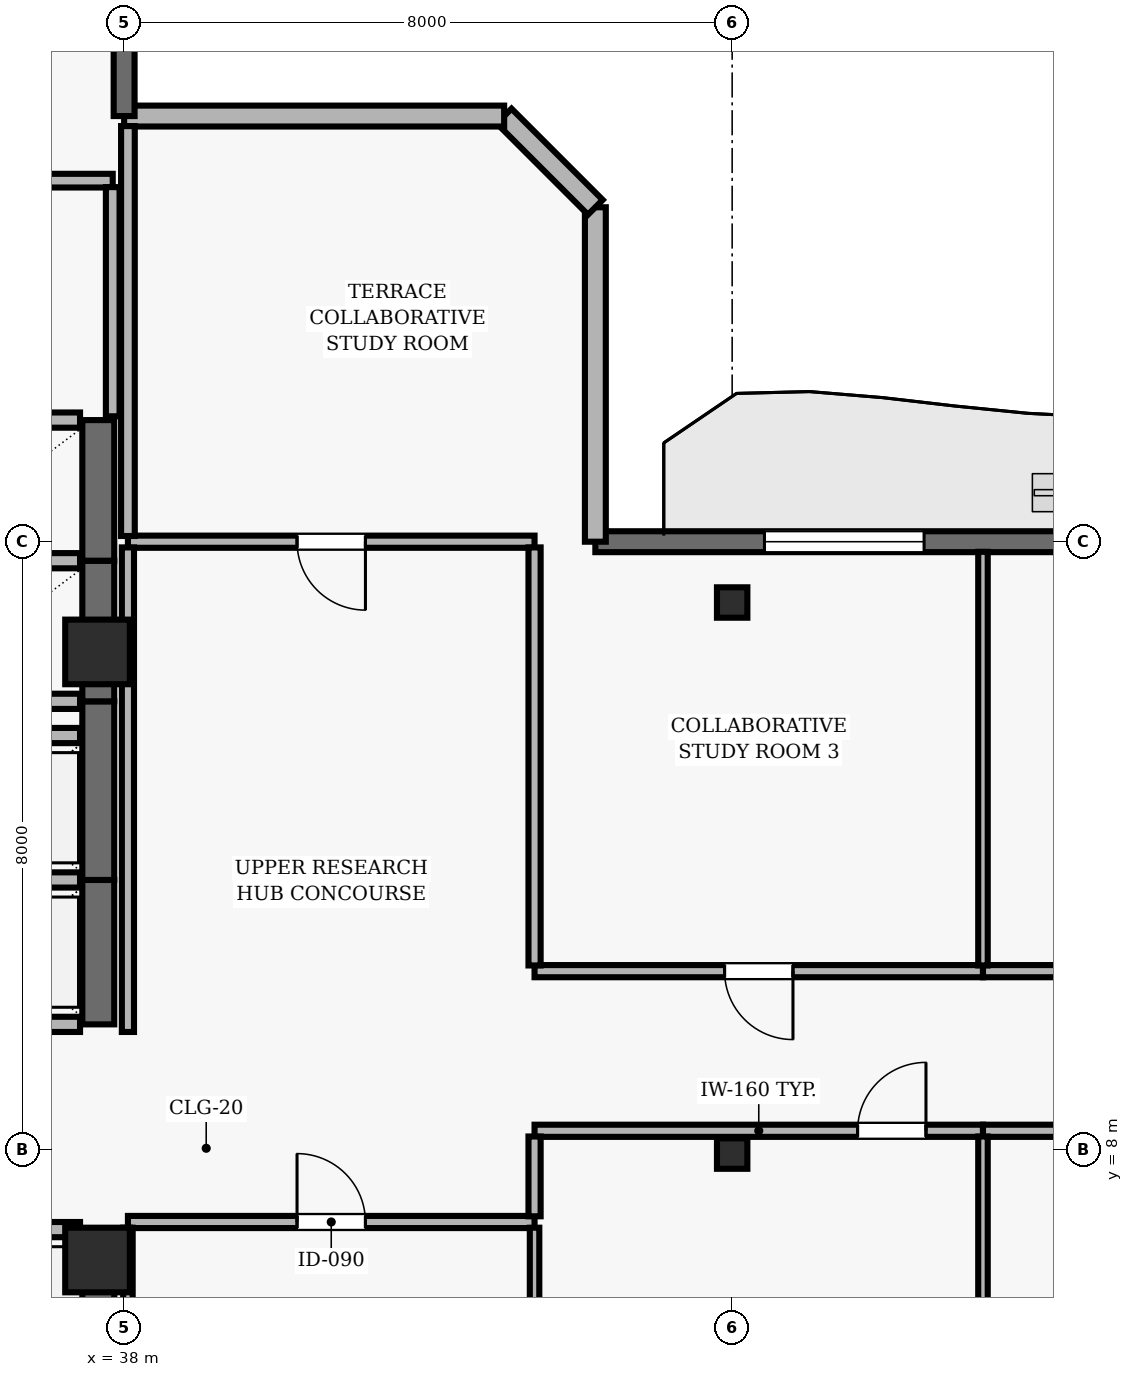
"""IFC4 building model, lengths in metres.
Left out: names, types, materials, properties, quantities, classifications, styles, units other than length and angle.
Written with IfcOpenShell. Run it as: python <this file> out.ifc"""

import sys

from ifc_helpers import new_model, si_unit, direction, frame, frame_2d, origin, origin_2d, place, context, subcontext, project, spatial, rectangle, hollow_rectangle, extrude, element, fill, save


model = new_model("IFC4")
c1 = context("Model", 3, precision=1e-05, world=origin(), true_north=direction((0.0, 1.0)))
c2 = subcontext(c1, "Body", "Model", "MODEL_VIEW")
j1 = project(units=[si_unit("LENGTHUNIT", "METRE"), si_unit("PLANEANGLEUNIT", "RADIAN")], contexts=[c1])
p1 = place(None, origin())
s1 = spatial("IfcSite", under=j1, at=p1, CompositionType="ELEMENT")
p2 = place(p1, origin())
s2 = spatial("IfcBuilding", under=s1, at=p2, CompositionType="ELEMENT")
p3 = place(p2, frame((0.0, 0.0, 291.1)))
s3 = spatial("IfcBuildingStorey", under=s2, at=p3, CompositionType="ELEMENT", Elevation=291.1)
for number, where, z_axis, x_axis in (
    (1, (37.65, 6.55, 0.0), (0.0, 0.0, 1.0), (1.0, 0.0, 0.0)),
    (2, (37.65, 14.55, 0.0), (0.0, 0.0, 1.0), (1.0, 0.0, 0.0)),
):
    element("IfcColumn", number, at=place(p3, frame(where, z_axis=z_axis, x_axis=x_axis)), inside=s3, PredefinedType="COLUMN", context=c2, shape_type="SweptSolid", body=[
        extrude(rectangle(XDim=0.85, YDim=0.85, at=origin_2d()), origin(), (0.0, 0.0, 1.0), 3.9),
    ])
for number, where, z_axis, x_axis in (
    (3, (46.0, 7.95, 0.0), (0.0, 0.0, 1.0), (1.0, 0.0, 0.0)),
    (4, (46.0, 15.2, 0.0), (0.0, 0.0, 1.0), (1.0, 0.0, 0.0)),
):
    element("IfcColumn", number, at=place(p3, frame(where, z_axis=z_axis, x_axis=x_axis)), inside=s3, PredefinedType="COLUMN", context=c2, shape_type="SweptSolid", body=[
        extrude(hollow_rectangle(XDim=0.4, YDim=0.4, WallThickness=0.02, at=origin_2d()), origin(), (0.0, 0.0, 1.0), 3.9),
    ])
p4 = place(p3, frame((57.3, 16.0, 0.0), z_axis=(0.0, 0.0, 1.0), x_axis=(-1.0, 0.0, 0.0)))
e5 = element("IfcWall", 5, at=p4, inside=s3, PredefinedType="SOLIDWALL", context=c2, shape_type="SweptSolid", body=[
    extrude(rectangle(XDim=13.1, YDim=0.275, at=frame_2d((6.55, 0.0))), origin(), (0.0, 0.0, 1.0), 3.69),
])
p5 = place(p4, frame((1.15, 0.0, 0.0)))
e6 = element("IfcOpeningElement", 6, at=p5, cuts=e5, PredefinedType="OPENING", context=c2, shape_type="SweptSolid", body=[
    extrude(rectangle(XDim=1.0, YDim=2.2, at=frame_2d((0.5, 1.1))), frame((0.0, 0.147, 0.0), z_axis=(0.0, -1.0, 0.0), x_axis=(1.0, 0.0, 0.0)), (0.0, 0.0, 1.0), 0.295),
])
p6 = place(p4, frame((3.125, 0.0, 0.9)))
e7 = element("IfcOpeningElement", 7, at=p6, cuts=e5, PredefinedType="OPENING", context=c2, shape_type="SweptSolid", body=[
    extrude(rectangle(XDim=2.1, YDim=1.6, at=frame_2d((1.05, 0.8))), frame((0.0, 0.147, 0.0), z_axis=(0.0, -1.0, 0.0), x_axis=(1.0, 0.0, 0.0)), (0.0, 0.0, 1.0), 0.295),
])
p7 = place(p4, frame((8.775, 0.0, 0.9)))
e8 = element("IfcOpeningElement", 8, at=p7, cuts=e5, PredefinedType="OPENING", context=c2, shape_type="SweptSolid", body=[
    extrude(rectangle(XDim=2.1, YDim=1.6, at=frame_2d((1.05, 0.8))), frame((0.0, 0.147, 0.0), z_axis=(0.0, -1.0, 0.0), x_axis=(1.0, 0.0, 0.0)), (0.0, 0.0, 1.0), 0.295),
])
p8 = place(p3, frame((44.2, 16.0, 0.0), z_axis=(0.0, 0.0, 1.0), x_axis=(0.0, 1.0, 0.0)))
e9 = element("IfcWall", 9, at=p8, inside=s3, PredefinedType="SOLIDWALL", context=c2, shape_type="SweptSolid", body=[
    extrude(rectangle(XDim=4.4, YDim=0.275, at=frame_2d((2.2, 0.0))), origin(), (0.0, 0.0, 1.0), 3.69),
])
p9 = place(p3, frame((44.2, 20.4, 0.0), z_axis=(0.0, 0.0, 1.0), x_axis=(-0.707034851297, 0.707178703759, 0.0)))
e10 = element("IfcWall", 10, at=p9, inside=s3, PredefinedType="SOLIDWALL", context=c2, shape_type="SweptSolid", body=[
    extrude(rectangle(XDim=1.697, YDim=0.275, at=frame_2d((0.849, 0.0))), origin(), (0.0, 0.0, 1.0), 3.69),
])
p10 = place(p3, frame((43.0, 21.6, 0.0), z_axis=(0.0, 0.0, 1.0), x_axis=(-1.0, 0.0, 0.0)))
e11 = element("IfcWall", 11, at=p10, inside=s3, PredefinedType="SOLIDWALL", context=c2, shape_type="SweptSolid", body=[
    extrude(rectangle(XDim=5.0, YDim=0.275, at=frame_2d((2.5, 0.0))), origin(), (0.0, 0.0, 1.0), 3.69),
])
p11 = place(p3, frame((38.0, 21.6, 0.0), z_axis=(0.0, 0.0, 1.0), x_axis=(0.0, 1.0, 0.0)))
e12 = element("IfcWall", 12, at=p11, inside=s3, PredefinedType="SOLIDWALL", context=c2, shape_type="SweptSolid", body=[
    extrude(rectangle(XDim=13.7, YDim=0.275, at=frame_2d((6.85, 0.0))), origin(), (0.0, 0.0, 1.0), 3.69),
])
p12 = place(p11, frame((5.35, 0.0, 0.0)))
e13 = element("IfcOpeningElement", 13, at=p12, cuts=e12, PredefinedType="OPENING", context=c2, shape_type="SweptSolid", body=[
    extrude(rectangle(XDim=1.0, YDim=2.2, at=frame_2d((0.5, 1.1))), frame((0.0, 0.147, 0.0), z_axis=(0.0, -1.0, 0.0), x_axis=(1.0, 0.0, 0.0)), (0.0, 0.0, 1.0), 0.295),
])
p13 = place(p11, frame((9.075, 0.0, 0.9)))
e14 = element("IfcOpeningElement", 14, at=p13, cuts=e12, PredefinedType="OPENING", context=c2, shape_type="SweptSolid", body=[
    extrude(rectangle(XDim=2.4, YDim=1.8, at=frame_2d((1.2, 0.9))), frame((0.0, 0.147, 0.0), z_axis=(0.0, -1.0, 0.0), x_axis=(1.0, 0.0, 0.0)), (0.0, 0.0, 1.0), 0.295),
])
p14 = place(p3, frame((37.66, 4.7, 0.0), z_axis=(0.0, 0.0, 1.0), x_axis=(0.0, 1.0, 0.0)))
e15 = element("IfcWall", 15, at=p14, inside=s3, PredefinedType="SHEAR", context=c2, shape_type="SweptSolid", body=[
    extrude(rectangle(XDim=2.25, YDim=0.42, at=frame_2d((1.125, 0.0))), origin(), (0.0, 0.0, 1.0), 3.69),
])
p15 = place(p3, frame((37.42, 6.95, 0.0), z_axis=(0.0, 0.0, 1.0), x_axis=(-1.0, 0.0, 0.0)))
e16 = element("IfcWall", 16, at=p15, inside=s3, PredefinedType="SOLIDWALL", context=c2, shape_type="SweptSolid", body=[
    extrude(rectangle(XDim=2.14, YDim=0.2, at=frame_2d((1.07, 0.0))), origin(), (0.0, 0.0, 1.0), 3.69),
])
p16 = place(p3, frame((37.66, 9.65, 0.0), z_axis=(0.0, 0.0, 1.0), x_axis=(0.0, 1.0, 0.0)))
e17 = element("IfcWall", 17, at=p16, inside=s3, PredefinedType="SHEAR", context=c2, shape_type="SweptSolid", body=[
    extrude(rectangle(XDim=1.9, YDim=0.42, at=frame_2d((0.95, 0.0))), origin(), (0.0, 0.0, 1.0), 3.69),
])
for number, where, z_axis, x_axis in (
    (18, (35.28, 9.65, 0.0), (0.0, 0.0, 1.0), (1.0, 0.0, 0.0)),
    (19, (37.42, 11.55, 0.0), (0.0, 0.0, 1.0), (-1.0, 0.0, 0.0)),
):
    element("IfcWall", number, at=place(p3, frame(where, z_axis=z_axis, x_axis=x_axis)), inside=s3, PredefinedType="SOLIDWALL", context=c2, shape_type="SweptSolid", body=[
        extrude(rectangle(XDim=2.14, YDim=0.2, at=frame_2d((1.07, 0.0))), origin(), (0.0, 0.0, 1.0), 3.69),
    ])
p17 = place(p3, frame((37.66, 11.55, 0.0), z_axis=(0.0, 0.0, 1.0), x_axis=(0.0, 1.0, 0.0)))
e20 = element("IfcWall", 20, at=p17, inside=s3, PredefinedType="SHEAR", context=c2, shape_type="SweptSolid", body=[
    extrude(rectangle(XDim=2.35, YDim=0.42, at=frame_2d((1.175, 0.0))), origin(), (0.0, 0.0, 1.0), 3.69),
])
p18 = place(p3, frame((37.42, 13.45, 0.0), z_axis=(0.0, 0.0, 1.0), x_axis=(-1.0, 0.0, 0.0)))
e21 = element("IfcWall", 21, at=p18, inside=s3, PredefinedType="SOLIDWALL", context=c2, shape_type="SweptSolid", body=[
    extrude(rectangle(XDim=2.14, YDim=0.2, at=frame_2d((1.07, 0.0))), origin(), (0.0, 0.0, 1.0), 3.69),
])
p19 = place(p3, frame((37.66, 13.9, 0.0), z_axis=(0.0, 0.0, 1.0), x_axis=(0.0, 1.0, 0.0)))
e22 = element("IfcWall", 22, at=p19, inside=s3, PredefinedType="SHEAR", context=c2, shape_type="SweptSolid", body=[
    extrude(rectangle(XDim=1.85, YDim=0.42, at=frame_2d((0.925, 0.0))), origin(), (0.0, 0.0, 1.0), 3.69),
])
for number, where, z_axis, x_axis in (
    (23, (35.28, 13.9, 0.0), (0.0, 0.0, 1.0), (1.0, 0.0, 0.0)),
    (24, (37.42, 15.75, 0.0), (0.0, 0.0, 1.0), (-1.0, 0.0, 0.0)),
):
    element("IfcWall", number, at=place(p3, frame(where, z_axis=z_axis, x_axis=x_axis)), inside=s3, PredefinedType="SOLIDWALL", context=c2, shape_type="SweptSolid", body=[
        extrude(rectangle(XDim=2.14, YDim=0.2, at=frame_2d((1.07, 0.0))), origin(), (0.0, 0.0, 1.0), 3.69),
    ])
p20 = place(p3, frame((37.66, 15.75, 0.0), z_axis=(0.0, 0.0, 1.0), x_axis=(0.0, 1.0, 0.0)))
e25 = element("IfcWall", 25, at=p20, inside=s3, PredefinedType="SHEAR", context=c2, shape_type="SweptSolid", body=[
    extrude(rectangle(XDim=1.85, YDim=0.42, at=frame_2d((0.925, 0.0))), origin(), (0.0, 0.0, 1.0), 3.69),
])
p21 = place(p3, frame((37.42, 17.6, 0.0), z_axis=(0.0, 0.0, 1.0), x_axis=(-1.0, 0.0, 0.0)))
e26 = element("IfcWall", 26, at=p21, inside=s3, PredefinedType="SOLIDWALL", context=c2, shape_type="SweptSolid", body=[
    extrude(rectangle(XDim=2.14, YDim=0.2, at=frame_2d((1.07, 0.0))), origin(), (0.0, 0.0, 1.0), 3.69),
])
p22 = place(p3, frame((37.85, 20.75, 0.0), z_axis=(0.0, 0.0, 1.0), x_axis=(-1.0, 0.0, 0.0)))
e27 = element("IfcWall", 27, at=p22, inside=s3, PredefinedType="PARTITIONING", context=c2, shape_type="SweptSolid", body=[
    extrude(rectangle(XDim=4.0, YDim=0.18, at=frame_2d((2.0, 0.0))), origin(), (0.0, 0.0, 1.0), 3.69),
])
p23 = place(p3, frame((38.05, 7.05, 0.0), z_axis=(0.0, 0.0, 1.0), x_axis=(1.0, 0.0, 0.0)))
e28 = element("IfcWall", 28, at=p23, inside=s3, PredefinedType="PARTITIONING", context=c2, shape_type="SweptSolid", body=[
    extrude(rectangle(XDim=5.35, YDim=0.16, at=frame_2d((2.675, 0.0))), origin(), (0.0, 0.0, 1.0), 3.69),
])
p24 = place(p23, frame((2.225, 0.0, 0.0)))
e29 = element("IfcOpeningElement", 29, at=p24, cuts=e28, PredefinedType="OPENING", context=c2, shape_type="SweptSolid", body=[
    extrude(rectangle(XDim=0.9, YDim=2.1, at=frame_2d((0.45, 1.05))), frame((0.0, 0.09, 0.0), z_axis=(0.0, -1.0, 0.0), x_axis=(1.0, 0.0, 0.0)), (0.0, 0.0, 1.0), 0.18),
])
p25 = place(p3, frame((43.4, 8.25, 0.0), z_axis=(0.0, 0.0, 1.0), x_axis=(1.0, 0.0, 0.0)))
e30 = element("IfcWall", 30, at=p25, inside=s3, PredefinedType="PARTITIONING", context=c2, shape_type="SweptSolid", body=[
    extrude(rectangle(XDim=5.9, YDim=0.16, at=frame_2d((2.95, 0.0))), origin(), (0.0, 0.0, 1.0), 3.227),
])
p26 = place(p25, frame((4.25, 0.0, 0.0)))
e31 = element("IfcOpeningElement", 31, at=p26, cuts=e30, PredefinedType="OPENING", context=c2, shape_type="SweptSolid", body=[
    extrude(rectangle(XDim=0.9, YDim=2.1, at=frame_2d((0.45, 1.05))), frame((0.0, 0.09, 0.0), z_axis=(0.0, -1.0, 0.0), x_axis=(1.0, 0.0, 0.0)), (0.0, 0.0, 1.0), 0.18),
])
p27 = place(p3, frame((43.4, 16.0, 0.0), z_axis=(0.0, 0.0, 1.0), x_axis=(-1.0, 0.0, 0.0)))
e32 = element("IfcWall", 32, at=p27, inside=s3, PredefinedType="PARTITIONING", context=c2, shape_type="SweptSolid", body=[
    extrude(rectangle(XDim=5.35, YDim=0.16, at=frame_2d((2.675, 0.0))), origin(), (0.0, 0.0, 1.0), 3.39),
])
p28 = place(p27, frame((2.225, 0.0, 0.0)))
e33 = element("IfcOpeningElement", 33, at=p28, cuts=e32, PredefinedType="OPENING", context=c2, shape_type="SweptSolid", body=[
    extrude(rectangle(XDim=0.9, YDim=2.1, at=frame_2d((0.45, 1.05))), frame((0.0, 0.09, 0.0), z_axis=(0.0, -1.0, 0.0), x_axis=(1.0, 0.0, 0.0)), (0.0, 0.0, 1.0), 0.18),
])
p29 = place(p3, frame((49.3, 8.25, 0.0), z_axis=(0.0, 0.0, 1.0), x_axis=(1.0, 0.0, 0.0)))
e34 = element("IfcWall", 34, at=p29, inside=s3, PredefinedType="PARTITIONING", context=c2, shape_type="SweptSolid", body=[
    extrude(rectangle(XDim=5.58, YDim=0.16, at=frame_2d((2.79, 0.0))), origin(), (0.0, 0.0, 1.0), 3.227),
])
p30 = place(p29, frame((3.74, 0.0, 0.0)))
e35 = element("IfcOpeningElement", 35, at=p30, cuts=e34, PredefinedType="OPENING", context=c2, shape_type="SweptSolid", body=[
    extrude(rectangle(XDim=0.9, YDim=2.1, at=frame_2d((0.45, 1.05))), frame((0.0, 0.09, 0.0), z_axis=(0.0, -1.0, 0.0), x_axis=(1.0, 0.0, 0.0)), (0.0, 0.0, 1.0), 0.18),
])
p31 = place(p3, frame((49.3, 10.35, 0.0), z_axis=(0.0, 0.0, 1.0), x_axis=(-1.0, 0.0, 0.0)))
e36 = element("IfcWall", 36, at=p31, inside=s3, PredefinedType="PARTITIONING", context=c2, shape_type="SweptSolid", body=[
    extrude(rectangle(XDim=5.9, YDim=0.16, at=frame_2d((2.95, 0.0))), origin(), (0.0, 0.0, 1.0), 3.424),
])
p32 = place(p31, frame((2.5, 0.0, 0.0)))
e37 = element("IfcOpeningElement", 37, at=p32, cuts=e36, PredefinedType="OPENING", context=c2, shape_type="SweptSolid", body=[
    extrude(rectangle(XDim=0.9, YDim=2.1, at=frame_2d((0.45, 1.05))), frame((0.0, 0.09, 0.0), z_axis=(0.0, -1.0, 0.0), x_axis=(1.0, 0.0, 0.0)), (0.0, 0.0, 1.0), 0.18),
])
p33 = place(p3, frame((54.88, 10.35, 0.0), z_axis=(0.0, 0.0, 1.0), x_axis=(-1.0, 0.0, 0.0)))
e38 = element("IfcWall", 38, at=p33, inside=s3, PredefinedType="PARTITIONING", context=c2, shape_type="SweptSolid", body=[
    extrude(rectangle(XDim=5.58, YDim=0.16, at=frame_2d((2.79, 0.0))), origin(), (0.0, 0.0, 1.0), 3.424),
])
p34 = place(p33, frame((2.34, 0.0, 0.0)))
e39 = element("IfcOpeningElement", 39, at=p34, cuts=e38, PredefinedType="OPENING", context=c2, shape_type="SweptSolid", body=[
    extrude(rectangle(XDim=0.9, YDim=2.1, at=frame_2d((0.45, 1.05))), frame((0.0, 0.09, 0.0), z_axis=(0.0, -1.0, 0.0), x_axis=(1.0, 0.0, 0.0)), (0.0, 0.0, 1.0), 0.18),
])
p35 = place(p3, frame((37.85, 17.65, 0.0), z_axis=(0.0, 0.0, 1.0), x_axis=(0.0, 1.0, 0.0)))
e40 = element("IfcWall", 40, at=p35, inside=s3, PredefinedType="PARTITIONING", context=c2, shape_type="SweptSolid", body=[
    extrude(rectangle(XDim=3.015, YDim=0.18, at=frame_2d((1.508, 0.0))), origin(), (0.0, 0.0, 1.0), 3.227),
])
p36 = place(p3, frame((38.05, 6.975, 0.0), z_axis=(0.0, 0.0, 1.0), x_axis=(0.0, -1.0, 0.0)))
e41 = element("IfcWall", 41, at=p36, inside=s3, PredefinedType="PARTITIONING", context=c2, shape_type="SweptSolid", body=[
    extrude(rectangle(XDim=6.842, YDim=0.125, at=frame_2d((3.421, 0.0))), origin(), (0.0, 0.0, 1.0), 3.227),
])
p37 = place(p3, frame((38.05, 15.925, 0.0), z_axis=(0.0, 0.0, 1.0), x_axis=(0.0, -1.0, 0.0)))
e42 = element("IfcWall", 42, at=p37, inside=s3, PredefinedType="PARTITIONING", context=c2, shape_type="SweptSolid", body=[
    extrude(rectangle(XDim=6.375, YDim=0.16, at=frame_2d((3.188, 0.0))), origin(), (0.0, 0.0, 1.0), 3.227),
])
p38 = place(p3, frame((38.05, 21.468, 0.0), z_axis=(0.0, 0.0, 1.0), x_axis=(0.0, -1.0, 0.0)))
e43 = element("IfcWall", 43, at=p38, inside=s3, PredefinedType="PARTITIONING", context=c2, shape_type="SweptSolid", body=[
    extrude(rectangle(XDim=5.393, YDim=0.18, at=frame_2d((2.697, 0.0))), origin(), (0.0, 0.0, 1.0), 3.227),
])
p39 = place(p3, frame((43.4, 0.133, 0.0), z_axis=(0.0, 0.0, 1.0), x_axis=(0.0, 1.0, 0.0)))
e44 = element("IfcWall", 44, at=p39, inside=s3, PredefinedType="PARTITIONING", context=c2, shape_type="SweptSolid", body=[
    extrude(rectangle(XDim=6.842, YDim=0.125, at=frame_2d((3.421, 0.0))), origin(), (0.0, 0.0, 1.0), 3.69),
])
p40 = place(p3, frame((43.4, 7.125, 0.0), z_axis=(0.0, 0.0, 1.0), x_axis=(0.0, 1.0, 0.0)))
e45 = element("IfcWall", 45, at=p40, inside=s3, PredefinedType="PARTITIONING", context=c2, shape_type="SweptSolid", body=[
    extrude(rectangle(XDim=1.05, YDim=0.16, at=frame_2d((0.525, 0.0))), origin(), (0.0, 0.0, 1.0), 3.69),
])
p41 = place(p3, frame((43.4, 10.425, 0.0), z_axis=(0.0, 0.0, 1.0), x_axis=(0.0, 1.0, 0.0)))
e46 = element("IfcWall", 46, at=p41, inside=s3, PredefinedType="PARTITIONING", context=c2, shape_type="SweptSolid", body=[
    extrude(rectangle(XDim=5.5, YDim=0.16, at=frame_2d((2.75, 0.0))), origin(), (0.0, 0.0, 1.0), 3.69),
])
p42 = place(p3, frame((49.3, 0.133, 0.0), z_axis=(0.0, 0.0, 1.0), x_axis=(0.0, 1.0, 0.0)))
e47 = element("IfcWall", 47, at=p42, inside=s3, PredefinedType="PARTITIONING", context=c2, shape_type="SweptSolid", body=[
    extrude(rectangle(XDim=8.042, YDim=0.125, at=frame_2d((4.021, 0.0))), origin(), (0.0, 0.0, 1.0), 3.69),
])
p43 = place(p3, frame((49.3, 10.425, 0.0), z_axis=(0.0, 0.0, 1.0), x_axis=(0.0, 1.0, 0.0)))
e48 = element("IfcWall", 48, at=p43, inside=s3, PredefinedType="PARTITIONING", context=c2, shape_type="SweptSolid", body=[
    extrude(rectangle(XDim=5.442, YDim=0.125, at=frame_2d((2.721, 0.0))), origin(), (0.0, 0.0, 1.0), 3.69),
])
p44 = place(p7, origin())
e49 = element("IfcWindow", 49, at=p44, inside=s3, PartitioningType="SINGLE_PANEL", PredefinedType="WINDOW", context=c2, shape_type="SweptSolid", body=[
    extrude(rectangle(XDim=2.1, YDim=1.6, at=frame_2d((1.05, 0.8))), frame((0.0, 0.03, 0.0), z_axis=(0.0, -1.0, 0.0), x_axis=(1.0, 0.0, 0.0)), (0.0, 0.0, 1.0), 0.06),
])
fill(e8, e49)
p45 = place(p24, origin())
e50 = element("IfcDoor", 50, at=p45, inside=s3, OperationType="SINGLE_SWING_LEFT", PredefinedType="DOOR", context=c2, shape_type="SweptSolid", body=[
    extrude(rectangle(XDim=0.9, YDim=2.1, at=frame_2d((0.45, 1.05))), frame((0.0, 0.025, 0.0), z_axis=(0.0, -1.0, 0.0), x_axis=(1.0, 0.0, 0.0)), (0.0, 0.0, 1.0), 0.05),
])
fill(e29, e50)
p46 = place(p26, origin())
e51 = element("IfcDoor", 51, at=p46, inside=s3, OperationType="SINGLE_SWING_RIGHT", PredefinedType="DOOR", context=c2, shape_type="SweptSolid", body=[
    extrude(rectangle(XDim=0.9, YDim=2.1, at=frame_2d((0.45, 1.05))), frame((0.0, 0.025, 0.0), z_axis=(0.0, -1.0, 0.0), x_axis=(1.0, 0.0, 0.0)), (0.0, 0.0, 1.0), 0.05),
])
fill(e31, e51)
p47 = place(p32, origin())
e52 = element("IfcDoor", 52, at=p47, inside=s3, OperationType="SINGLE_SWING_LEFT", PredefinedType="DOOR", context=c2, shape_type="SweptSolid", body=[
    extrude(rectangle(XDim=0.9, YDim=2.1, at=frame_2d((0.45, 1.05))), frame((0.0, 0.025, 0.0), z_axis=(0.0, -1.0, 0.0), x_axis=(1.0, 0.0, 0.0)), (0.0, 0.0, 1.0), 0.05),
])
fill(e37, e52)
p48 = place(p28, origin())
e53 = element("IfcDoor", 53, at=p48, inside=s3, OperationType="SINGLE_SWING_LEFT", PredefinedType="DOOR", context=c2, shape_type="SweptSolid", body=[
    extrude(rectangle(XDim=0.9, YDim=2.1, at=frame_2d((0.45, 1.05))), frame((0.0, 0.025, 0.0), z_axis=(0.0, -1.0, 0.0), x_axis=(1.0, 0.0, 0.0)), (0.0, 0.0, 1.0), 0.05),
])
fill(e33, e53)
save(model, sys.argv[1])
